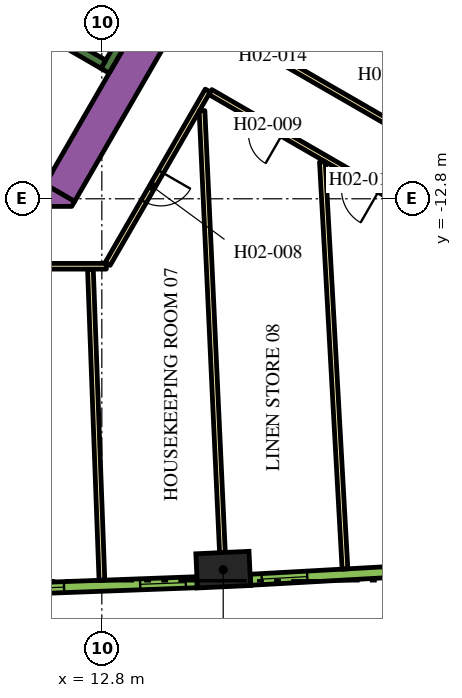
"""IFC4 building model, lengths in metres.
Left out: names, types, materials, properties, quantities, classifications, styles, units other than length and angle.
Written with IfcOpenShell. Run it as: python <this file> out.ifc"""

import sys

from ifc_helpers import new_model, si_unit, direction, frame, frame_2d, origin, origin_2d, place, context, subcontext, project, spatial, polyline, rectangle, outline, extrude, element, fill, save


model = new_model("IFC4")
c1 = context("Model", 3, precision=1e-05, world=origin(), true_north=direction((0.0, 1.0)))
c2 = subcontext(c1, "Body", "Model", "MODEL_VIEW")
j1 = project(units=[si_unit("LENGTHUNIT", "METRE"), si_unit("PLANEANGLEUNIT", "RADIAN")], contexts=[c1])
p1 = place(None, origin())
s1 = spatial("IfcSite", under=j1, at=p1, CompositionType="ELEMENT")
p2 = place(p1, origin())
s2 = spatial("IfcBuilding", under=s1, at=p2, CompositionType="ELEMENT")
p3 = place(p2, frame((0.0, 0.0, 39.3)))
s3 = spatial("IfcBuildingStorey", under=s2, at=p3, CompositionType="ELEMENT", Elevation=39.3)
p4 = place(p3, frame((15.994, -22.558, 0.0), z_axis=(0.0, 0.0, 1.0), x_axis=(0.998932216029, 0.04619986774, 0.0)))
e1 = element("IfcColumn", 1, at=p4, inside=s3, PredefinedType="COLUMN", context=c2, shape_type="SweptSolid", body=[
    extrude(rectangle(XDim=1.4, YDim=0.9, at=origin_2d()), origin(), (0.0, 0.0, 1.0), 3.9),
])
p5 = place(p3, frame((11.695, -12.644, 0.0), z_axis=(0.0, 0.0, 1.0), x_axis=(0.500010229568, 0.86601949766, 0.0)))
e2 = element("IfcWall", 2, at=p5, inside=s3, PredefinedType="SOLIDWALL", context=c2, shape_type="SweptSolid", body=[
    extrude(rectangle(XDim=9.326, YDim=0.9, at=frame_2d((4.663, 0.0))), origin(), (0.0, 0.0, 1.0), 3.9),
])
p6 = place(p3, origin())
e3 = element("IfcWall", 3, at=p6, inside=s3, PredefinedType="SOLIDWALL", context=c2, shape_type="SweptSolid", body=[
    extrude(outline(polyline([(12.009, -13.0), (11.312, -13.0), (11.312, -12.425), (12.083, -12.871), (12.009, -13.0)])), origin(), (0.0, 0.0, 1.0), 3.9),
])
p7 = place(p3, frame((12.885, -9.431, 0.0), z_axis=(0.0, 0.0, 1.0), x_axis=(0.500020560727, 0.866013532718, 0.0)))
e4 = element("IfcWall", 4, at=p7, inside=s3, PredefinedType="SOLIDWALL", context=c2, shape_type="SweptSolid", body=[
    extrude(rectangle(XDim=3.45, YDim=0.25, at=frame_2d((1.725, 0.0))), origin(), (0.0, 0.0, 1.0), 3.9),
])
p8 = place(p3, frame((12.84, -9.261, 0.0), z_axis=(0.0, 0.0, 1.0), x_axis=(-0.866013990052, 0.500019768644, 0.0)))
e5 = element("IfcWall", 5, at=p8, inside=s3, PredefinedType="SOLIDWALL", context=c2, shape_type="SweptSolid", body=[
    extrude(rectangle(XDim=6.8, YDim=0.25, at=frame_2d((3.4, 0.0))), origin(), (0.0, 0.0, 1.0), 3.9),
])
p9 = place(p3, frame((16.412, -8.523, 0.0), z_axis=(0.0, 0.0, 1.0), x_axis=(0.866022197818, -0.500005552856, 0.0)))
e6 = element("IfcWall", 6, at=p9, inside=s3, PredefinedType="PARTITIONING", context=c2, shape_type="SweptSolid", body=[
    extrude(rectangle(XDim=16.224, YDim=0.15, at=frame_2d((8.112, 0.0))), origin(), (0.0, 0.0, 1.0), 2.75),
])
p10 = place(p9, frame((7.949, 0.0, 0.0)))
e7 = element("IfcOpeningElement", 7, at=p10, cuts=e6, PredefinedType="OPENING", context=c2, shape_type="SweptSolid", body=[
    extrude(rectangle(XDim=1.0, YDim=2.1, at=frame_2d((0.5, 1.05))), frame((0.0, 0.085, 0.0), z_axis=(0.0, -1.0, 0.0), x_axis=(1.0, 0.0, 0.0)), (0.0, 0.0, 1.0), 0.17),
])
p11 = place(p9, frame((0.526, 0.0, 0.0)))
e8 = element("IfcOpeningElement", 8, at=p11, cuts=e6, PredefinedType="OPENING", context=c2, shape_type="SweptSolid", body=[
    extrude(rectangle(XDim=1.0, YDim=2.1, at=frame_2d((0.5, 1.05))), frame((0.0, 0.085, 0.0), z_axis=(0.0, -1.0, 0.0), x_axis=(1.0, 0.0, 0.0)), (0.0, 0.0, 1.0), 0.17),
])
p12 = place(p3, frame((12.918, -14.575, 0.0), z_axis=(0.0, 0.0, 1.0), x_axis=(-1.0, 0.0, 0.0)))
e9 = element("IfcWall", 9, at=p12, inside=s3, PredefinedType="PARTITIONING", context=c2, shape_type="SweptSolid", body=[
    extrude(rectangle(XDim=25.766, YDim=0.15, at=frame_2d((12.883, 0.0))), origin(), (0.0, 0.0, 1.0), 2.75),
])
p13 = place(p12, frame((17.141, 0.0, 0.0)))
e10 = element("IfcOpeningElement", 10, at=p13, cuts=e9, PredefinedType="OPENING", context=c2, shape_type="SweptSolid", body=[
    extrude(rectangle(XDim=1.0, YDim=2.1, at=frame_2d((0.5, 1.05))), frame((0.0, 0.085, 0.0), z_axis=(0.0, -1.0, 0.0), x_axis=(1.0, 0.0, 0.0)), (0.0, 0.0, 1.0), 0.17),
])
p14 = place(p12, frame((9.259, 0.0, 0.0)))
e11 = element("IfcOpeningElement", 11, at=p14, cuts=e9, PredefinedType="OPENING", context=c2, shape_type="SweptSolid", body=[
    extrude(rectangle(XDim=1.0, YDim=2.1, at=frame_2d((0.5, 1.05))), frame((0.0, 0.085, 0.0), z_axis=(0.0, -1.0, 0.0), x_axis=(1.0, 0.0, 0.0)), (0.0, 0.0, 1.0), 0.17),
])
p15 = place(p12, frame((3.044, 0.0, 0.0)))
e12 = element("IfcOpeningElement", 12, at=p15, cuts=e9, PredefinedType="OPENING", context=c2, shape_type="SweptSolid", body=[
    extrude(rectangle(XDim=1.0, YDim=2.1, at=frame_2d((0.5, 1.05))), frame((0.0, 0.085, 0.0), z_axis=(0.0, -1.0, 0.0), x_axis=(1.0, 0.0, 0.0)), (0.0, 0.0, 1.0), 0.17),
])
p16 = place(p3, frame((15.587, -9.952, 0.0), z_axis=(0.0, 0.0, 1.0), x_axis=(-0.500016618951, -0.866015808616, 0.0)))
e13 = element("IfcWall", 13, at=p16, inside=s3, PredefinedType="PARTITIONING", context=c2, shape_type="SweptSolid", body=[
    extrude(rectangle(XDim=5.268, YDim=0.15, at=frame_2d((2.634, 0.0))), origin(), (0.0, 0.0, 1.0), 2.75),
])
p17 = place(p16, frame((2.465, 0.0, 0.0)))
e14 = element("IfcOpeningElement", 14, at=p17, cuts=e13, PredefinedType="OPENING", context=c2, shape_type="SweptSolid", body=[
    extrude(rectangle(XDim=0.9, YDim=2.1, at=frame_2d((0.45, 1.05))), frame((0.0, 0.085, 0.0), z_axis=(0.0, -1.0, 0.0), x_axis=(1.0, 0.0, 0.0)), (0.0, 0.0, 1.0), 0.17),
])
p18 = place(p3, frame((29.638, -18.064, 0.0), z_axis=(0.0, 0.0, 1.0), x_axis=(-0.866026175601, 0.499998663172, 0.0)))
e15 = element("IfcWall", 15, at=p18, inside=s3, PredefinedType="PARTITIONING", context=c2, shape_type="SweptSolid", body=[
    extrude(rectangle(XDim=16.144, YDim=0.15, at=frame_2d((8.072, 0.0))), origin(), (0.0, 0.0, 1.0), 2.75),
])
p19 = place(p18, frame((13.948, 0.0, 0.0)))
e16 = element("IfcOpeningElement", 16, at=p19, cuts=e15, PredefinedType="OPENING", context=c2, shape_type="SweptSolid", body=[
    extrude(rectangle(XDim=0.9, YDim=2.1, at=frame_2d((0.45, 1.05))), frame((0.0, 0.085, 0.0), z_axis=(0.0, -1.0, 0.0), x_axis=(1.0, 0.0, 0.0)), (0.0, 0.0, 1.0), 0.17),
])
p20 = place(p18, frame((11.004, 0.0, 0.0)))
e17 = element("IfcOpeningElement", 17, at=p20, cuts=e15, PredefinedType="OPENING", context=c2, shape_type="SweptSolid", body=[
    extrude(rectangle(XDim=1.0, YDim=2.1, at=frame_2d((0.5, 1.05))), frame((0.0, 0.085, 0.0), z_axis=(0.0, -1.0, 0.0), x_axis=(1.0, 0.0, 0.0)), (0.0, 0.0, 1.0), 0.17),
])
p21 = place(p3, frame((12.802, -22.836, 0.0), z_axis=(0.0, 0.0, 1.0), x_axis=(-0.036969723281, 0.999316386116, 0.0)))
e18 = element("IfcWall", 18, at=p21, inside=s3, PredefinedType="PARTITIONING", context=c2, shape_type="SweptSolid", body=[
    extrude(rectangle(XDim=8.182, YDim=0.15, at=frame_2d((4.091, 0.0))), origin(), (0.0, 0.0, 1.0), 2.75),
])
p22 = place(p3, frame((15.973, -22.109, 0.0), z_axis=(0.0, 0.0, 1.0), x_axis=(-0.046191717129, 0.998932592955, 0.0)))
e19 = element("IfcWall", 19, at=p22, inside=s3, PredefinedType="PARTITIONING", context=c2, shape_type="SweptSolid", body=[
    extrude(rectangle(XDim=11.638, YDim=0.15, at=frame_2d((5.819, 0.0))), origin(), (0.0, 0.0, 1.0), 2.75),
])
p23 = place(p3, frame((19.198, -22.541, 0.0), z_axis=(0.0, 0.0, 1.0), x_axis=(-0.055432210572, 0.99846245299, 0.0)))
e20 = element("IfcWall", 20, at=p23, inside=s3, PredefinedType="PARTITIONING", context=c2, shape_type="SweptSolid", body=[
    extrude(rectangle(XDim=10.729, YDim=0.15, at=frame_2d((5.365, 0.0))), origin(), (0.0, 0.0, 1.0), 2.75),
])
p24 = place(p3, frame((10.31, -23.074, 0.0), z_axis=(0.0, 0.0, 1.0), x_axis=(0.999317974969, 0.036926750529, 0.0)))
e21 = element("IfcWall", 21, at=p24, inside=s3, PredefinedType="SOLIDWALL", context=c2, shape_type="SweptSolid", body=[
    extrude(rectangle(XDim=4.998, YDim=0.29, at=frame_2d((2.499, 0.0))), origin(), (0.0, 0.0, 1.0), 3.65),
])
p25 = place(p24, frame((0.297, 0.0, 0.9)))
e22 = element("IfcOpeningElement", 22, at=p25, cuts=e21, PredefinedType="OPENING", context=c2, shape_type="SweptSolid", body=[
    extrude(rectangle(XDim=1.2, YDim=2.15, at=frame_2d((0.6, 1.075))), frame((0.0, 0.155, 0.0), z_axis=(0.0, -1.0, 0.0), x_axis=(1.0, 0.0, 0.0)), (0.0, 0.0, 1.0), 0.31),
])
p26 = place(p24, frame((3.501, 0.0, 0.9)))
e23 = element("IfcOpeningElement", 23, at=p26, cuts=e21, PredefinedType="OPENING", context=c2, shape_type="SweptSolid", body=[
    extrude(rectangle(XDim=1.2, YDim=2.15, at=frame_2d((0.6, 1.075))), frame((0.0, 0.155, 0.0), z_axis=(0.0, -1.0, 0.0), x_axis=(1.0, 0.0, 0.0)), (0.0, 0.0, 1.0), 0.31),
])
p27 = place(p3, frame((16.711, -22.824, 0.0), z_axis=(0.0, 0.0, 1.0), x_axis=(0.998464708705, 0.055391564976, 0.0)))
e24 = element("IfcWall", 24, at=p27, inside=s3, PredefinedType="SOLIDWALL", context=c2, shape_type="SweptSolid", body=[
    extrude(rectangle(XDim=4.998, YDim=0.29, at=frame_2d((2.499, 0.0))), origin(), (0.0, 0.0, 1.0), 3.65),
])
p28 = place(p27, frame((0.297, 0.0, 0.9)))
e25 = element("IfcOpeningElement", 25, at=p28, cuts=e24, PredefinedType="OPENING", context=c2, shape_type="SweptSolid", body=[
    extrude(rectangle(XDim=1.2, YDim=2.15, at=frame_2d((0.6, 1.075))), frame((0.0, 0.155, 0.0), z_axis=(0.0, -1.0, 0.0), x_axis=(1.0, 0.0, 0.0)), (0.0, 0.0, 1.0), 0.31),
])
p29 = place(p27, frame((3.501, 0.0, 0.9)))
e26 = element("IfcOpeningElement", 26, at=p29, cuts=e24, PredefinedType="OPENING", context=c2, shape_type="SweptSolid", body=[
    extrude(rectangle(XDim=1.2, YDim=2.15, at=frame_2d((0.6, 1.075))), frame((0.0, 0.155, 0.0), z_axis=(0.0, -1.0, 0.0), x_axis=(1.0, 0.0, 0.0)), (0.0, 0.0, 1.0), 0.31),
])
p30 = place(p17, origin())
e27 = element("IfcDoor", 27, at=p30, inside=s3, OperationType="SINGLE_SWING_LEFT", PredefinedType="DOOR", context=c2, shape_type="SweptSolid", body=[
    extrude(rectangle(XDim=0.9, YDim=2.1, at=frame_2d((0.45, 1.05))), frame((0.0, 0.025, 0.0), z_axis=(0.0, -1.0, 0.0), x_axis=(1.0, 0.0, 0.0)), (0.0, 0.0, 1.0), 0.05),
])
fill(e14, e27)
p31 = place(p19, origin())
e28 = element("IfcDoor", 28, at=p31, inside=s3, OperationType="SINGLE_SWING_RIGHT", PredefinedType="DOOR", context=c2, shape_type="SweptSolid", body=[
    extrude(rectangle(XDim=0.9, YDim=2.1, at=frame_2d((0.45, 1.05))), frame((0.0, 0.025, 0.0), z_axis=(0.0, -1.0, 0.0), x_axis=(1.0, 0.0, 0.0)), (0.0, 0.0, 1.0), 0.05),
])
fill(e16, e28)
p32 = place(p20, origin())
e29 = element("IfcDoor", 29, at=p32, inside=s3, OperationType="SINGLE_SWING_RIGHT", PredefinedType="DOOR", context=c2, shape_type="SweptSolid", body=[
    extrude(rectangle(XDim=1.0, YDim=2.1, at=frame_2d((0.5, 1.05))), frame((0.0, 0.025, 0.0), z_axis=(0.0, -1.0, 0.0), x_axis=(1.0, 0.0, 0.0)), (0.0, 0.0, 1.0), 0.05),
])
fill(e17, e29)
p33 = place(p11, origin())
e30 = element("IfcDoor", 30, at=p33, inside=s3, OperationType="SINGLE_SWING_LEFT", PredefinedType="DOOR", context=c2, shape_type="SweptSolid", body=[
    extrude(rectangle(XDim=1.0, YDim=2.1, at=frame_2d((0.5, 1.05))), frame((0.0, 0.025, 0.0), z_axis=(0.0, -1.0, 0.0), x_axis=(1.0, 0.0, 0.0)), (0.0, 0.0, 1.0), 0.05),
])
fill(e8, e30)
p34 = place(p25, origin())
e31 = element("IfcWindow", 31, at=p34, inside=s3, PartitioningType="DOUBLE_PANEL_VERTICAL", PredefinedType="WINDOW", context=c2, shape_type="SweptSolid", body=[
    extrude(rectangle(XDim=1.2, YDim=2.15, at=frame_2d((0.6, 1.075))), frame((0.0, 0.015, 0.0), z_axis=(0.0, -1.0, 0.0), x_axis=(1.0, 0.0, 0.0)), (0.0, 0.0, 1.0), 0.06),
])
fill(e22, e31)
p35 = place(p26, origin())
e32 = element("IfcWindow", 32, at=p35, inside=s3, PartitioningType="DOUBLE_PANEL_VERTICAL", PredefinedType="WINDOW", context=c2, shape_type="SweptSolid", body=[
    extrude(rectangle(XDim=1.2, YDim=2.15, at=frame_2d((0.6, 1.075))), frame((0.0, 0.015, 0.0), z_axis=(0.0, -1.0, 0.0), x_axis=(1.0, 0.0, 0.0)), (0.0, 0.0, 1.0), 0.06),
])
fill(e23, e32)
p36 = place(p28, origin())
e33 = element("IfcWindow", 33, at=p36, inside=s3, PartitioningType="DOUBLE_PANEL_VERTICAL", PredefinedType="WINDOW", context=c2, shape_type="SweptSolid", body=[
    extrude(rectangle(XDim=1.2, YDim=2.15, at=frame_2d((0.6, 1.075))), frame((0.0, 0.015, 0.0), z_axis=(0.0, -1.0, 0.0), x_axis=(1.0, 0.0, 0.0)), (0.0, 0.0, 1.0), 0.06),
])
fill(e25, e33)
save(model, sys.argv[1])
